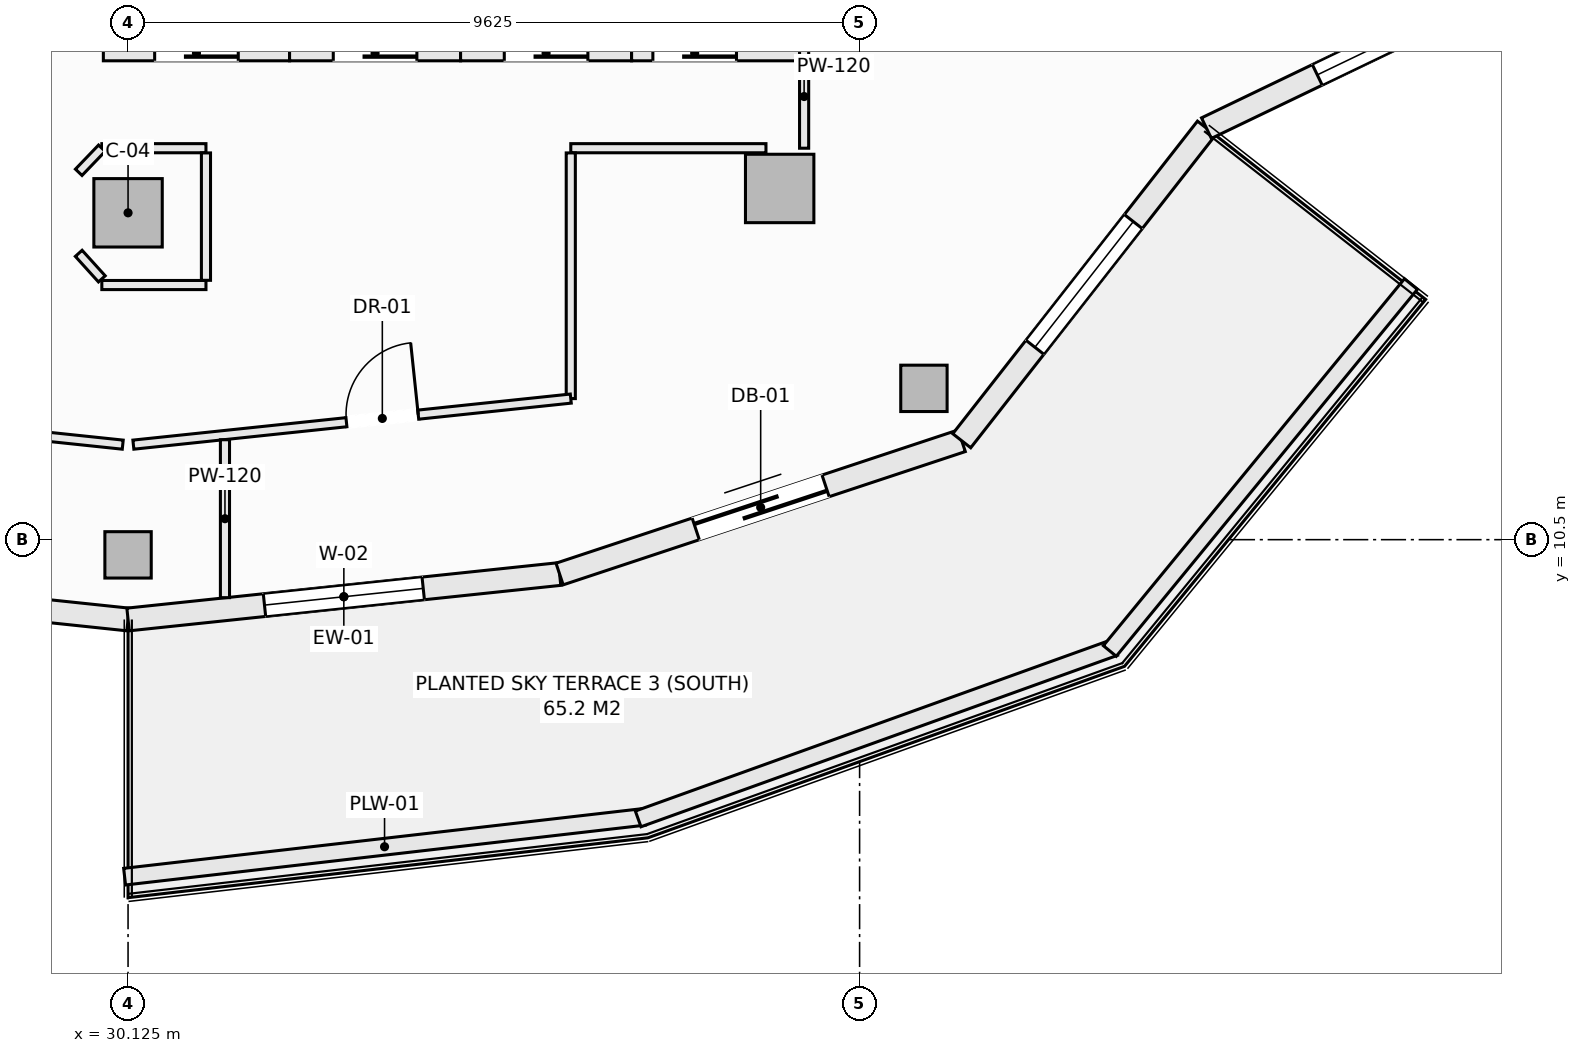
"""IFC4 building model, lengths in metres.
Left out: names, types, materials, properties, quantities, classifications, styles, units other than length and angle.
Written with IfcOpenShell. Run it as: python <this file> out.ifc"""

import sys

from ifc_helpers import new_model, si_unit, direction, frame, frame_2d, origin, origin_2d, place, context, subcontext, project, spatial, rectangle, hollow_rectangle, extrude, element, fill, save


model = new_model("IFC4")
c1 = context("Model", 3, precision=1e-05, world=origin(), true_north=direction((0.0, 1.0)))
c2 = subcontext(c1, "Body", "Model", "MODEL_VIEW")
j1 = project(units=[si_unit("LENGTHUNIT", "METRE"), si_unit("PLANEANGLEUNIT", "RADIAN")], contexts=[c1])
p1 = place(None, origin())
s1 = spatial("IfcSite", under=j1, at=p1, CompositionType="ELEMENT")
p2 = place(p1, origin())
s2 = spatial("IfcBuilding", under=s1, at=p2, CompositionType="ELEMENT")
p3 = place(p2, frame((0.0, 0.0, 180.1)))
s3 = spatial("IfcBuildingStorey", under=s2, at=p3, CompositionType="ELEMENT", Elevation=180.1)
for number, where, z_axis, x_axis in (
    (1, (30.125, 10.3, -0.27), (0.0, 0.0, 1.0), (1.0, 0.0, 0.0)),
    (2, (40.596, 12.49, -0.27), (0.0, 0.0, 1.0), (1.0, 0.0, 0.0)),
):
    element("IfcColumn", number, at=place(p3, frame(where, z_axis=z_axis, x_axis=x_axis)), inside=s3, PredefinedType="COLUMN", context=c2, shape_type="SweptSolid", body=[
        extrude(hollow_rectangle(XDim=0.61, YDim=0.61, WallThickness=0.025, at=origin_2d()), origin(), (0.0, 0.0, 1.0), 3.4),
    ])
for number, where, z_axis, x_axis in (
    (3, (30.125, 14.8, -0.27), (0.0, 0.0, 1.0), (1.0, 0.0, 0.0)),
    (4, (38.698, 15.121, -0.27), (0.0, 0.0, 1.0), (1.0, 0.0, 0.0)),
):
    element("IfcColumn", number, at=place(p3, frame(where, z_axis=z_axis, x_axis=x_axis)), inside=s3, PredefinedType="COLUMN", context=c2, shape_type="SweptSolid", body=[
        extrude(rectangle(XDim=0.9, YDim=0.9, at=origin_2d()), origin(), (0.0, 0.0, 1.0), 3.4),
    ])
p4 = place(p3, frame((24.447, 10.048, 0.0), z_axis=(0.0, 0.0, 1.0), x_axis=(0.994496545245, -0.104769372887, 0.0)))
e5 = element("IfcWall", 5, at=p4, inside=s3, PredefinedType="SOLIDWALL", context=c2, shape_type="SweptSolid", body=[
    extrude(rectangle(XDim=5.709, YDim=0.3, at=frame_2d((2.854, 0.0))), origin(), (0.0, 0.0, 1.0), 2.653),
])
p5 = place(p4, frame((1.805, 0.0, 0.74)))
e6 = element("IfcOpeningElement", 6, at=p5, cuts=e5, PredefinedType="OPENING", context=c2, shape_type="SweptSolid", body=[
    extrude(rectangle(XDim=2.1, YDim=1.7, at=frame_2d((1.05, 0.85))), frame((0.0, 0.16, 0.0), z_axis=(0.0, -1.0, 0.0), x_axis=(1.0, 0.0, 0.0)), (0.0, 0.0, 1.0), 0.32),
])
p6 = place(p3, frame((30.125, 9.45, 0.0), z_axis=(0.0, 0.0, 1.0), x_axis=(0.994496545245, 0.104769372887, 0.0)))
e7 = element("IfcWall", 7, at=p6, inside=s3, PredefinedType="SOLIDWALL", context=c2, shape_type="SweptSolid", body=[
    extrude(rectangle(XDim=5.709, YDim=0.3, at=frame_2d((2.854, 0.0))), origin(), (0.0, 0.0, 1.0), 2.653),
])
p7 = place(p6, frame((1.805, 0.0, 0.74)))
e8 = element("IfcOpeningElement", 8, at=p7, cuts=e7, PredefinedType="OPENING", context=c2, shape_type="SweptSolid", body=[
    extrude(rectangle(XDim=2.1, YDim=1.7, at=frame_2d((1.05, 0.85))), frame((0.0, 0.16, 0.0), z_axis=(0.0, -1.0, 0.0), x_axis=(1.0, 0.0, 0.0)), (0.0, 0.0, 1.0), 0.32),
])
p8 = place(p3, frame((35.803, 10.048, 0.0), z_axis=(0.0, 0.0, 1.0), x_axis=(0.949246811547, 0.314532177636, 0.0)))
e9 = element("IfcWall", 9, at=p8, inside=s3, PredefinedType="SOLIDWALL", context=c2, shape_type="SweptSolid", body=[
    extrude(rectangle(XDim=5.574, YDim=0.3, at=frame_2d((2.787, 0.0))), origin(), (0.0, 0.0, 1.0), 2.653),
])
p9 = place(p8, frame((1.887, 0.0, 0.0)))
e10 = element("IfcOpeningElement", 10, at=p9, cuts=e9, PredefinedType="OPENING", context=c2, shape_type="SweptSolid", body=[
    extrude(rectangle(XDim=1.8, YDim=2.25, at=frame_2d((0.9, 1.125))), frame((0.0, 0.16, 0.0), z_axis=(0.0, -1.0, 0.0), x_axis=(1.0, 0.0, 0.0)), (0.0, 0.0, 1.0), 0.32),
])
p10 = place(p3, frame((41.094, 11.801, 0.0), z_axis=(0.0, 0.0, 1.0), x_axis=(0.616429245738, 0.787410302828, 0.0)))
e11 = element("IfcWall", 11, at=p10, inside=s3, PredefinedType="SOLIDWALL", context=c2, shape_type="SweptSolid", body=[
    extrude(rectangle(XDim=5.223, YDim=0.3, at=frame_2d((2.612, 0.0))), origin(), (0.0, 0.0, 1.0), 2.653),
])
p11 = place(p10, frame((1.562, 0.0, 0.74)))
e12 = element("IfcOpeningElement", 12, at=p11, cuts=e11, PredefinedType="OPENING", context=c2, shape_type="SweptSolid", body=[
    extrude(rectangle(XDim=2.1, YDim=1.7, at=frame_2d((1.05, 0.85))), frame((0.0, 0.16, 0.0), z_axis=(0.0, -1.0, 0.0), x_axis=(1.0, 0.0, 0.0)), (0.0, 0.0, 1.0), 0.32),
])
p12 = place(p3, frame((44.313, 15.914, 0.0), z_axis=(0.0, 0.0, 1.0), x_axis=(0.901353070301, 0.433085029363, 0.0)))
e13 = element("IfcWall", 13, at=p12, inside=s3, PredefinedType="SOLIDWALL", context=c2, shape_type="SweptSolid", body=[
    extrude(rectangle(XDim=5.336, YDim=0.3, at=frame_2d((2.668, 0.0))), origin(), (0.0, 0.0, 1.0), 2.653),
])
p13 = place(p12, frame((1.618, 0.0, 0.74)))
e14 = element("IfcOpeningElement", 14, at=p13, cuts=e13, PredefinedType="OPENING", context=c2, shape_type="SweptSolid", body=[
    extrude(rectangle(XDim=2.1, YDim=1.7, at=frame_2d((1.05, 0.85))), frame((0.0, 0.16, 0.0), z_axis=(0.0, -1.0, 0.0), x_axis=(1.0, 0.0, 0.0)), (0.0, 0.0, 1.0), 0.32),
])
p14 = place(p3, frame((30.08, 6.066, 0.0), z_axis=(0.0, 0.0, 1.0), x_axis=(0.993440576506, 0.114349555972, 0.0)))
e15 = element("IfcWall", 15, at=p14, inside=s3, PredefinedType="PARAPET", context=c2, shape_type="SweptSolid", body=[
    extrude(rectangle(XDim=6.885, YDim=0.22, at=frame_2d((3.443, 0.0))), origin(), (0.0, 0.0, 1.0), 0.52),
])
p15 = place(p3, frame((36.837, 6.826, 0.0), z_axis=(0.0, 0.0, 1.0), x_axis=(0.940948576924, 0.338549517184, 0.0)))
e16 = element("IfcWall", 16, at=p15, inside=s3, PredefinedType="PARAPET", context=c2, shape_type="SweptSolid", body=[
    extrude(rectangle(XDim=6.664, YDim=0.22, at=frame_2d((3.332, 0.0))), origin(), (0.0, 0.0, 1.0), 0.52),
])
p16 = place(p3, frame((43.042, 9.036, 0.0), z_axis=(0.0, 0.0, 1.0), x_axis=(0.634429234628, 0.77298094818, 0.0)))
e17 = element("IfcWall", 17, at=p16, inside=s3, PredefinedType="PARAPET", context=c2, shape_type="SweptSolid", body=[
    extrude(rectangle(XDim=6.245, YDim=0.22, at=frame_2d((3.123, 0.0))), origin(), (0.0, 0.0, 1.0), 0.52),
])
p17 = place(p3, frame((29.8, 16.9, 0.0), z_axis=(0.0, 0.0, 1.0), x_axis=(1.0, 0.0, 0.0)))
e18 = element("IfcWall", 18, at=p17, inside=s3, PredefinedType="SOLIDWALL", context=c2, shape_type="SweptSolid", body=[
    extrude(rectangle(XDim=2.45, YDim=0.2, at=frame_2d((1.225, 0.0))), origin(), (0.0, 0.0, 1.0), 3.13),
])
p18 = place(p17, frame((0.675, 0.0, 0.0)))
e19 = element("IfcOpeningElement", 19, at=p18, cuts=e18, PredefinedType="OPENING", context=c2, shape_type="SweptSolid", body=[
    extrude(rectangle(XDim=1.1, YDim=2.2, at=frame_2d((0.55, 1.1))), frame((0.0, 0.11, 0.0), z_axis=(0.0, -1.0, 0.0), x_axis=(1.0, 0.0, 0.0)), (0.0, 0.0, 1.0), 0.22),
])
p19 = place(p3, frame((32.25, 16.9, 0.0), z_axis=(0.0, 0.0, 1.0), x_axis=(1.0, 0.0, 0.0)))
e20 = element("IfcWall", 20, at=p19, inside=s3, PredefinedType="SOLIDWALL", context=c2, shape_type="SweptSolid", body=[
    extrude(rectangle(XDim=2.25, YDim=0.2, at=frame_2d((1.125, 0.0))), origin(), (0.0, 0.0, 1.0), 3.13),
])
p20 = place(p19, frame((0.575, 0.0, 0.0)))
e21 = element("IfcOpeningElement", 21, at=p20, cuts=e20, PredefinedType="OPENING", context=c2, shape_type="SweptSolid", body=[
    extrude(rectangle(XDim=1.1, YDim=2.2, at=frame_2d((0.55, 1.1))), frame((0.0, 0.11, 0.0), z_axis=(0.0, -1.0, 0.0), x_axis=(1.0, 0.0, 0.0)), (0.0, 0.0, 1.0), 0.22),
])
p21 = place(p3, frame((34.5, 16.9, 0.0), z_axis=(0.0, 0.0, 1.0), x_axis=(1.0, 0.0, 0.0)))
e22 = element("IfcWall", 22, at=p21, inside=s3, PredefinedType="SOLIDWALL", context=c2, shape_type="SweptSolid", body=[
    extrude(rectangle(XDim=2.25, YDim=0.2, at=frame_2d((1.125, 0.0))), origin(), (0.0, 0.0, 1.0), 3.13),
])
p22 = place(p21, frame((0.575, 0.0, 0.0)))
e23 = element("IfcOpeningElement", 23, at=p22, cuts=e22, PredefinedType="OPENING", context=c2, shape_type="SweptSolid", body=[
    extrude(rectangle(XDim=1.1, YDim=2.2, at=frame_2d((0.55, 1.1))), frame((0.0, 0.11, 0.0), z_axis=(0.0, -1.0, 0.0), x_axis=(1.0, 0.0, 0.0)), (0.0, 0.0, 1.0), 0.22),
])
p23 = place(p3, frame((36.75, 16.9, 0.0), z_axis=(0.0, 0.0, 1.0), x_axis=(1.0, 0.0, 0.0)))
e24 = element("IfcWall", 24, at=p23, inside=s3, PredefinedType="SOLIDWALL", context=c2, shape_type="SweptSolid", body=[
    extrude(rectangle(XDim=2.25, YDim=0.2, at=frame_2d((1.125, 0.0))), origin(), (0.0, 0.0, 1.0), 3.13),
])
p24 = place(p23, frame((0.28, 0.0, 0.0)))
e25 = element("IfcOpeningElement", 25, at=p24, cuts=e24, PredefinedType="OPENING", context=c2, shape_type="SweptSolid", body=[
    extrude(rectangle(XDim=1.1, YDim=2.2, at=frame_2d((0.55, 1.1))), frame((0.0, 0.11, 0.0), z_axis=(0.0, -1.0, 0.0), x_axis=(1.0, 0.0, 0.0)), (0.0, 0.0, 1.0), 0.22),
])
p25 = place(p3, frame((39.02, 15.65, 0.0), z_axis=(0.0, 0.0, 1.0), x_axis=(0.0, 1.0, 0.0)))
e26 = element("IfcWall", 26, at=p25, inside=s3, PredefinedType="PARTITIONING", context=c2, shape_type="SweptSolid", body=[
    extrude(rectangle(XDim=1.36, YDim=0.12, at=frame_2d((0.68, 0.0))), origin(), (0.0, 0.0, 1.0), 2.505),
])
p26 = place(p3, frame((29.78, 15.65, 0.0), z_axis=(0.0, 0.0, 1.0), x_axis=(1.0, 0.0, 0.0)))
e27 = element("IfcWall", 27, at=p26, inside=s3, PredefinedType="PARTITIONING", context=c2, shape_type="SweptSolid", body=[
    extrude(rectangle(XDim=1.37, YDim=0.12, at=frame_2d((0.685, 0.0))), origin(), (0.0, 0.0, 1.0), 3.13),
])
p27 = place(p3, frame((35.95, 15.65, 0.0), z_axis=(0.0, 0.0, 1.0), x_axis=(1.0, 0.0, 0.0)))
e28 = element("IfcWall", 28, at=p27, inside=s3, PredefinedType="PARTITIONING", context=c2, shape_type="SweptSolid", body=[
    extrude(rectangle(XDim=2.568, YDim=0.12, at=frame_2d((1.284, 0.0))), origin(), (0.0, 0.0, 1.0), 3.13),
])
p28 = place(p3, frame((35.95, 12.356, 0.0), z_axis=(0.0, 0.0, 1.0), x_axis=(0.0, 1.0, 0.0)))
e29 = element("IfcWall", 29, at=p28, inside=s3, PredefinedType="PARTITIONING", context=c2, shape_type="SweptSolid", body=[
    extrude(rectangle(XDim=3.232, YDim=0.12, at=frame_2d((1.616, 0.0))), origin(), (0.0, 0.0, 1.0), 3.13),
])
p29 = place(p3, frame((30.195, 11.75, 0.0), z_axis=(0.0, 0.0, 1.0), x_axis=(0.994502215954, 0.104715531139, 0.0)))
e30 = element("IfcWall", 30, at=p29, inside=s3, PredefinedType="PARTITIONING", context=c2, shape_type="SweptSolid", body=[
    extrude(rectangle(XDim=5.787, YDim=0.12, at=frame_2d((2.893, 0.0))), origin(), (0.0, 0.0, 1.0), 3.13),
])
p30 = place(p29, frame((2.819, 0.0, 0.0)))
e31 = element("IfcOpeningElement", 31, at=p30, cuts=e30, PredefinedType="OPENING", context=c2, shape_type="SweptSolid", body=[
    extrude(rectangle(XDim=0.95, YDim=2.1, at=frame_2d((0.475, 1.05))), frame((0.0, 0.07, 0.0), z_axis=(0.0, -1.0, 0.0), x_axis=(1.0, 0.0, 0.0)), (0.0, 0.0, 1.0), 0.14),
])
p31 = place(p3, frame((27.15, 12.056, 0.0), z_axis=(0.0, 0.0, 1.0), x_axis=(0.994501330468, -0.104723940422, 0.0)))
e32 = element("IfcWall", 32, at=p31, inside=s3, PredefinedType="PARTITIONING", context=c2, shape_type="SweptSolid", body=[
    extrude(rectangle(XDim=2.921, YDim=0.12, at=frame_2d((1.46, 0.0))), origin(), (0.0, 0.0, 1.0), 3.13),
])
p32 = place(p3, frame((29.476, 15.333, 0.0), z_axis=(0.0, 0.0, 1.0), x_axis=(0.692219273951, 0.721687243043, 0.0)))
e33 = element("IfcWall", 33, at=p32, inside=s3, PredefinedType="PARTITIONING", context=c2, shape_type="SweptSolid", body=[
    extrude(rectangle(XDim=0.439, YDim=0.12, at=frame_2d((0.22, 0.0))), origin(), (0.0, 0.0, 1.0), 3.13),
])
p33 = place(p3, frame((29.476, 14.267, 0.0), z_axis=(0.0, 0.0, 1.0), x_axis=(0.670659392016, -0.741765448037, 0.0)))
e34 = element("IfcWall", 34, at=p33, inside=s3, PredefinedType="PARTITIONING", context=c2, shape_type="SweptSolid", body=[
    extrude(rectangle(XDim=0.453, YDim=0.12, at=frame_2d((0.227, 0.0))), origin(), (0.0, 0.0, 1.0), 3.13),
])
p34 = place(p3, frame((29.78, 13.85, 0.0), z_axis=(0.0, 0.0, 1.0), x_axis=(1.0, 0.0, 0.0)))
e35 = element("IfcWall", 35, at=p34, inside=s3, PredefinedType="PARTITIONING", context=c2, shape_type="SweptSolid", body=[
    extrude(rectangle(XDim=1.37, YDim=0.12, at=frame_2d((0.685, 0.0))), origin(), (0.0, 0.0, 1.0), 3.13),
])
p35 = place(p3, frame((31.15, 13.912, 0.0), z_axis=(0.0, 0.0, 1.0), x_axis=(0.0, 1.0, 0.0)))
e36 = element("IfcWall", 36, at=p35, inside=s3, PredefinedType="PARTITIONING", context=c2, shape_type="SweptSolid", body=[
    extrude(rectangle(XDim=1.676, YDim=0.12, at=frame_2d((0.838, 0.0))), origin(), (0.0, 0.0, 1.0), 3.13),
])
p36 = place(p3, frame((31.4, 9.737, 0.0), z_axis=(0.0, 0.0, 1.0), x_axis=(0.0, 1.0, 0.0)))
e37 = element("IfcWall", 37, at=p36, inside=s3, PredefinedType="PARTITIONING", context=c2, shape_type="SweptSolid", body=[
    extrude(rectangle(XDim=2.077, YDim=0.12, at=frame_2d((1.039, 0.0))), origin(), (0.0, 0.0, 1.0), 3.13),
])
p37 = place(p7, origin())
e38 = element("IfcWindow", 38, at=p37, inside=s3, PartitioningType="SINGLE_PANEL", PredefinedType="WINDOW", context=c2, shape_type="SweptSolid", body=[
    extrude(rectangle(XDim=2.1, YDim=1.7, at=frame_2d((1.05, 0.85))), frame((0.0, 0.03, 0.0), z_axis=(0.0, -1.0, 0.0), x_axis=(1.0, 0.0, 0.0)), (0.0, 0.0, 1.0), 0.06),
])
fill(e8, e38)
p38 = place(p9, frame((1.8, 0.0, 0.0), z_axis=(0.0, 0.0, 1.0), x_axis=(-1.0, 0.0, 0.0)))
e39 = element("IfcDoor", 39, at=p38, inside=s3, OperationType="SLIDING_TO_LEFT", PredefinedType="DOOR", context=c2, shape_type="SweptSolid", body=[
    extrude(rectangle(XDim=1.8, YDim=2.25, at=frame_2d((0.9, 1.125))), frame((0.0, 0.025, 0.0), z_axis=(0.0, -1.0, 0.0), x_axis=(1.0, 0.0, 0.0)), (0.0, 0.0, 1.0), 0.05),
])
fill(e10, e39)
p39 = place(p11, origin())
e40 = element("IfcWindow", 40, at=p39, inside=s3, PartitioningType="SINGLE_PANEL", PredefinedType="WINDOW", context=c2, shape_type="SweptSolid", body=[
    extrude(rectangle(XDim=2.1, YDim=1.7, at=frame_2d((1.05, 0.85))), frame((0.0, 0.03, 0.0), z_axis=(0.0, -1.0, 0.0), x_axis=(1.0, 0.0, 0.0)), (0.0, 0.0, 1.0), 0.06),
])
fill(e12, e40)
p40 = place(p13, origin())
e41 = element("IfcWindow", 41, at=p40, inside=s3, PartitioningType="SINGLE_PANEL", PredefinedType="WINDOW", context=c2, shape_type="SweptSolid", body=[
    extrude(rectangle(XDim=2.1, YDim=1.7, at=frame_2d((1.05, 0.85))), frame((0.0, 0.03, 0.0), z_axis=(0.0, -1.0, 0.0), x_axis=(1.0, 0.0, 0.0)), (0.0, 0.0, 1.0), 0.06),
])
fill(e14, e41)
p41 = place(p18, origin())
e42 = element("IfcDoor", 42, at=p41, inside=s3, OperationType="SLIDING_TO_LEFT", PredefinedType="DOOR", context=c2, shape_type="SweptSolid", body=[
    extrude(rectangle(XDim=1.1, YDim=2.2, at=frame_2d((0.55, 1.1))), frame((0.0, 0.025, 0.0), z_axis=(0.0, -1.0, 0.0), x_axis=(1.0, 0.0, 0.0)), (0.0, 0.0, 1.0), 0.05),
])
fill(e19, e42)
p42 = place(p20, origin())
e43 = element("IfcDoor", 43, at=p42, inside=s3, OperationType="SLIDING_TO_LEFT", PredefinedType="DOOR", context=c2, shape_type="SweptSolid", body=[
    extrude(rectangle(XDim=1.1, YDim=2.2, at=frame_2d((0.55, 1.1))), frame((0.0, 0.025, 0.0), z_axis=(0.0, -1.0, 0.0), x_axis=(1.0, 0.0, 0.0)), (0.0, 0.0, 1.0), 0.05),
])
fill(e21, e43)
p43 = place(p22, origin())
e44 = element("IfcDoor", 44, at=p43, inside=s3, OperationType="SLIDING_TO_LEFT", PredefinedType="DOOR", context=c2, shape_type="SweptSolid", body=[
    extrude(rectangle(XDim=1.1, YDim=2.2, at=frame_2d((0.55, 1.1))), frame((0.0, 0.025, 0.0), z_axis=(0.0, -1.0, 0.0), x_axis=(1.0, 0.0, 0.0)), (0.0, 0.0, 1.0), 0.05),
])
fill(e23, e44)
p44 = place(p24, origin())
e45 = element("IfcDoor", 45, at=p44, inside=s3, OperationType="SLIDING_TO_LEFT", PredefinedType="DOOR", context=c2, shape_type="SweptSolid", body=[
    extrude(rectangle(XDim=1.1, YDim=2.2, at=frame_2d((0.55, 1.1))), frame((0.0, 0.025, 0.0), z_axis=(0.0, -1.0, 0.0), x_axis=(1.0, 0.0, 0.0)), (0.0, 0.0, 1.0), 0.05),
])
fill(e25, e45)
p45 = place(p30, origin())
e46 = element("IfcDoor", 46, at=p45, inside=s3, OperationType="SINGLE_SWING_RIGHT", PredefinedType="DOOR", context=c2, shape_type="SweptSolid", body=[
    extrude(rectangle(XDim=0.95, YDim=2.1, at=frame_2d((0.475, 1.05))), frame((0.0, 0.025, 0.0), z_axis=(0.0, -1.0, 0.0), x_axis=(1.0, 0.0, 0.0)), (0.0, 0.0, 1.0), 0.05),
])
fill(e31, e46)
save(model, sys.argv[1])
